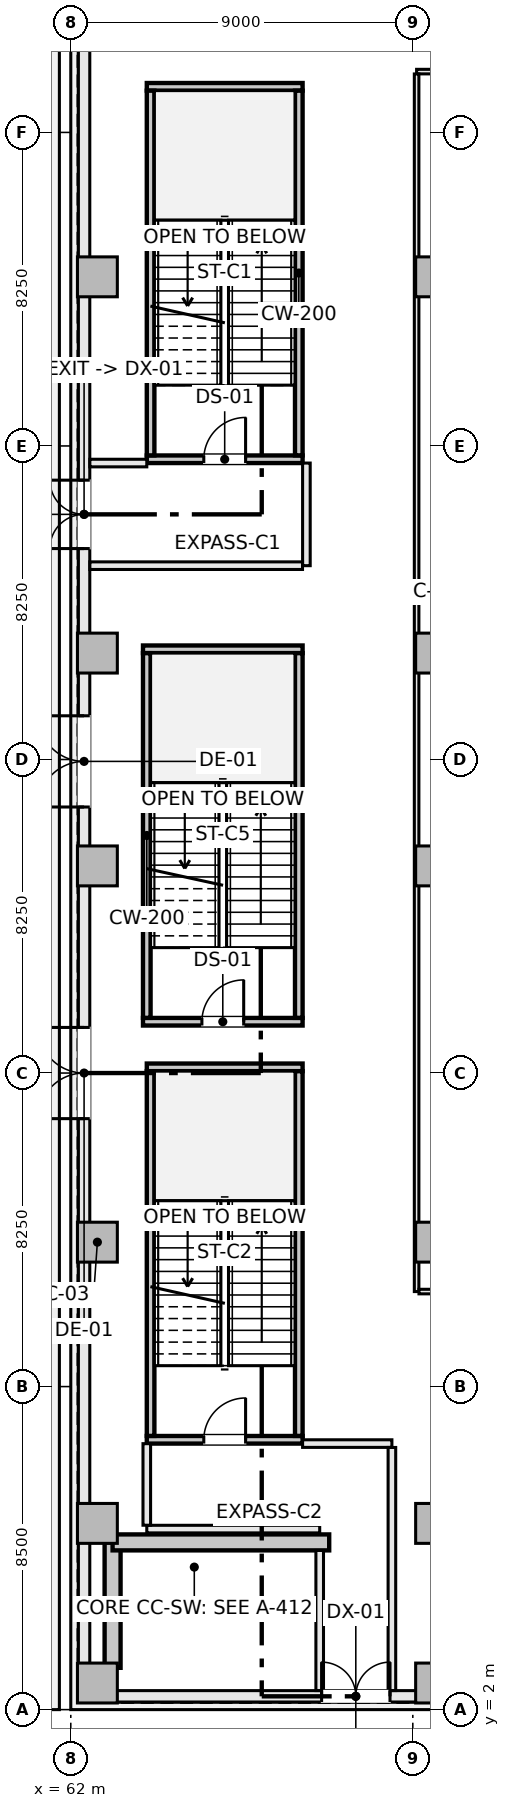
"""IFC4 building model, lengths in metres.
Left out: names, types, materials, properties, quantities, classifications, styles, units other than length and angle.
Written with IfcOpenShell. Run it as: python <this file> out.ifc"""

import sys

from ifc_helpers import new_model, si_unit, direction, frame, frame_2d, origin, origin_2d, place, context, subcontext, project, spatial, rectangle, extrude, element, fill, save


model = new_model("IFC4")
c1 = context("Model", 3, precision=1e-05, world=origin(), true_north=direction((0.0, 1.0)))
c2 = subcontext(c1, "Body", "Model", "MODEL_VIEW")
j1 = project(units=[si_unit("LENGTHUNIT", "METRE"), si_unit("PLANEANGLEUNIT", "RADIAN")], contexts=[c1])
p1 = place(None, origin())
s1 = spatial("IfcSite", under=j1, at=p1, CompositionType="ELEMENT")
p2 = place(p1, origin())
s2 = spatial("IfcBuilding", under=s1, at=p2, CompositionType="ELEMENT")
p3 = place(p2, origin())
s3 = spatial("IfcBuildingStorey", under=s2, at=p3, CompositionType="ELEMENT", Elevation=0.0)
p4 = place(p3, frame((63.1, 3.1, -0.36), z_axis=(0.0, 0.0, 1.0), x_axis=(0.0, 1.0, 0.0)))
e1 = element("IfcWall", 1, at=p4, inside=s3, PredefinedType="SHEAR", context=c2, shape_type="SweptSolid", body=[
    extrude(rectangle(XDim=3.3, YDim=0.42, at=frame_2d((1.65, 0.0))), origin(), (0.0, 0.0, 1.0), 5.1),
])
p5 = place(p3, frame((63.1, 6.4, -0.36), z_axis=(0.0, 0.0, 1.0), x_axis=(1.0, 0.0, 0.0)))
e2 = element("IfcWall", 2, at=p5, inside=s3, PredefinedType="SHEAR", context=c2, shape_type="SweptSolid", body=[
    extrude(rectangle(XDim=5.7, YDim=0.42, at=frame_2d((2.85, 0.0))), origin(), (0.0, 0.0, 1.0), 5.1),
])
for number, where, z_axis, x_axis in (
    (3, (62.7, 2.7, -0.36), (0.0, 0.0, 1.0), (1.0, 0.0, 0.0)),
    (4, (62.7, 6.9, -0.36), (0.0, 0.0, 1.0), (1.0, 0.0, 0.0)),
    (5, (62.7, 14.3, -0.36), (0.0, 0.0, 1.0), (1.0, 0.0, 0.0)),
    (6, (62.7, 24.2, -0.36), (0.0, 0.0, 1.0), (1.0, 0.0, 0.0)),
    (7, (62.7, 29.8, -0.36), (0.0, 0.0, 1.0), (1.0, 0.0, 0.0)),
    (8, (62.7, 39.7, -0.36), (0.0, 0.0, 1.0), (1.0, 0.0, 0.0)),
    (9, (71.6, 2.7, -0.36), (0.0, 0.0, 1.0), (1.0, 0.0, 0.0)),
    (10, (71.6, 6.9, -0.36), (0.0, 0.0, 1.0), (1.0, 0.0, 0.0)),
    (11, (71.6, 14.3, -0.36), (0.0, 0.0, 1.0), (1.0, 0.0, 0.0)),
    (12, (71.6, 24.2, -0.36), (0.0, 0.0, 1.0), (1.0, 0.0, 0.0)),
    (13, (71.6, 29.8, -0.36), (0.0, 0.0, 1.0), (1.0, 0.0, 0.0)),
    (14, (71.6, 39.7, -0.36), (0.0, 0.0, 1.0), (1.0, 0.0, 0.0)),
):
    element("IfcColumn", number, at=place(p3, frame(where, z_axis=z_axis, x_axis=x_axis)), inside=s3, PredefinedType="COLUMN", context=c2, shape_type="SweptSolid", body=[
        extrude(rectangle(XDim=1.05, YDim=1.05, at=origin_2d()), origin(), (0.0, 0.0, 1.0), 5.1),
    ])
p6 = place(p3, frame((62.35, 2.35, 0.0), z_axis=(0.0, 0.0, 1.0), x_axis=(1.0, 0.0, 0.0)))
e15 = element("IfcWall", 15, at=p6, inside=s3, PredefinedType="SOLIDWALL", context=c2, shape_type="SweptSolid", body=[
    extrude(rectangle(XDim=35.3, YDim=0.3, at=frame_2d((17.65, 0.0))), origin(), (0.0, 0.0, 1.0), 4.74),
])
p7 = place(p6, frame((6.25, 0.0, 0.0)))
e16 = element("IfcOpeningElement", 16, at=p7, cuts=e15, PredefinedType="OPENING", context=c2, shape_type="SweptSolid", body=[
    extrude(rectangle(XDim=1.8, YDim=2.3, at=frame_2d((0.9, 1.15))), frame((0.0, 0.16, 0.0), z_axis=(0.0, -1.0, 0.0), x_axis=(1.0, 0.0, 0.0)), (0.0, 0.0, 1.0), 0.32),
])
p8 = place(p6, frame((10.35, 0.0, 0.0)))
e17 = element("IfcOpeningElement", 17, at=p8, cuts=e15, PredefinedType="OPENING", context=c2, shape_type="SweptSolid", body=[
    extrude(rectangle(XDim=1.8, YDim=2.3, at=frame_2d((0.9, 1.15))), frame((0.0, 0.16, 0.0), z_axis=(0.0, -1.0, 0.0), x_axis=(1.0, 0.0, 0.0)), (0.0, 0.0, 1.0), 0.32),
])
p9 = place(p6, frame((27.2, 0.0, 0.0)))
e18 = element("IfcOpeningElement", 18, at=p9, cuts=e15, PredefinedType="OPENING", context=c2, shape_type="SweptSolid", body=[
    extrude(rectangle(XDim=1.8, YDim=2.3, at=frame_2d((0.9, 1.15))), frame((0.0, 0.16, 0.0), z_axis=(0.0, -1.0, 0.0), x_axis=(1.0, 0.0, 0.0)), (0.0, 0.0, 1.0), 0.32),
])
p10 = place(p3, frame((62.35, 2.35, 0.0), z_axis=(0.0, 0.0, 1.0), x_axis=(0.0, 1.0, 0.0)))
e19 = element("IfcWall", 19, at=p10, inside=s3, PredefinedType="SOLIDWALL", context=c2, shape_type="SweptSolid", body=[
    extrude(rectangle(XDim=49.3, YDim=0.3, at=frame_2d((24.65, 0.0))), origin(), (0.0, 0.0, 1.0), 4.74),
])
p11 = place(p10, frame((15.2, 0.0, 0.0)))
e20 = element("IfcOpeningElement", 20, at=p11, cuts=e19, PredefinedType="OPENING", context=c2, shape_type="SweptSolid", body=[
    extrude(rectangle(XDim=2.4, YDim=2.6, at=frame_2d((1.2, 1.3))), frame((0.0, 0.16, 0.0), z_axis=(0.0, -1.0, 0.0), x_axis=(1.0, 0.0, 0.0)), (0.0, 0.0, 1.0), 0.32),
])
p12 = place(p10, frame((23.4, 0.0, 0.0)))
e21 = element("IfcOpeningElement", 21, at=p12, cuts=e19, PredefinedType="OPENING", context=c2, shape_type="SweptSolid", body=[
    extrude(rectangle(XDim=2.4, YDim=2.6, at=frame_2d((1.2, 1.3))), frame((0.0, 0.16, 0.0), z_axis=(0.0, -1.0, 0.0), x_axis=(1.0, 0.0, 0.0)), (0.0, 0.0, 1.0), 0.32),
])
p13 = place(p10, frame((30.2, 0.0, 0.0)))
e22 = element("IfcOpeningElement", 22, at=p13, cuts=e19, PredefinedType="OPENING", context=c2, shape_type="SweptSolid", body=[
    extrude(rectangle(XDim=1.8, YDim=2.3, at=frame_2d((0.9, 1.15))), frame((0.0, 0.16, 0.0), z_axis=(0.0, -1.0, 0.0), x_axis=(1.0, 0.0, 0.0)), (0.0, 0.0, 1.0), 0.32),
])
p14 = place(p3, frame((64.0, 34.9, -0.36), z_axis=(0.0, 0.0, 1.0), x_axis=(1.0, 0.0, 0.0)))
e23 = element("IfcWall", 23, at=p14, inside=s3, PredefinedType="SHEAR", context=c2, shape_type="SweptSolid", body=[
    extrude(rectangle(XDim=4.1, YDim=0.2, at=frame_2d((2.05, 0.0))), origin(), (0.0, 0.0, 1.0), 5.1),
])
p15 = place(p14, frame((1.5, 0.0, 0.36)))
e24 = element("IfcOpeningElement", 24, at=p15, cuts=e23, PredefinedType="OPENING", context=c2, shape_type="SweptSolid", body=[
    extrude(rectangle(XDim=1.1, YDim=2.15, at=frame_2d((0.55, 1.075))), frame((0.0, 0.11, 0.0), z_axis=(0.0, -1.0, 0.0), x_axis=(1.0, 0.0, 0.0)), (0.0, 0.0, 1.0), 0.22),
])
p16 = place(p3, frame((64.0, 44.7, -0.36), z_axis=(0.0, 0.0, 1.0), x_axis=(1.0, 0.0, 0.0)))
e25 = element("IfcWall", 25, at=p16, inside=s3, PredefinedType="SHEAR", context=c2, shape_type="SweptSolid", body=[
    extrude(rectangle(XDim=4.1, YDim=0.2, at=frame_2d((2.05, 0.0))), origin(), (0.0, 0.0, 1.0), 5.1),
])
for number, where, z_axis, x_axis in (
    (26, (64.1, 35.002, -0.36), (0.0, 0.0, 1.0), (0.0, 1.0, 0.0)),
    (27, (68.0, 35.002, -0.36), (0.0, 0.0, 1.0), (0.0, 1.0, 0.0)),
):
    element("IfcWall", number, at=place(p3, frame(where, z_axis=z_axis, x_axis=x_axis)), inside=s3, PredefinedType="SHEAR", context=c2, shape_type="SweptSolid", body=[
        extrude(rectangle(XDim=9.596, YDim=0.2, at=frame_2d((4.798, 0.0))), origin(), (0.0, 0.0, 1.0), 5.1),
    ])
p17 = place(p3, frame((64.0, 9.1, -0.36), z_axis=(0.0, 0.0, 1.0), x_axis=(1.0, 0.0, 0.0)))
e28 = element("IfcWall", 28, at=p17, inside=s3, PredefinedType="SHEAR", context=c2, shape_type="SweptSolid", body=[
    extrude(rectangle(XDim=4.1, YDim=0.2, at=frame_2d((2.05, 0.0))), origin(), (0.0, 0.0, 1.0), 5.1),
])
p18 = place(p17, frame((1.5, 0.0, 0.36)))
e29 = element("IfcOpeningElement", 29, at=p18, cuts=e28, PredefinedType="OPENING", context=c2, shape_type="SweptSolid", body=[
    extrude(rectangle(XDim=1.1, YDim=2.15, at=frame_2d((0.55, 1.075))), frame((0.0, 0.11, 0.0), z_axis=(0.0, -1.0, 0.0), x_axis=(1.0, 0.0, 0.0)), (0.0, 0.0, 1.0), 0.22),
])
p19 = place(p3, frame((64.0, 18.9, -0.36), z_axis=(0.0, 0.0, 1.0), x_axis=(1.0, 0.0, 0.0)))
e30 = element("IfcWall", 30, at=p19, inside=s3, PredefinedType="SHEAR", context=c2, shape_type="SweptSolid", body=[
    extrude(rectangle(XDim=4.1, YDim=0.2, at=frame_2d((2.05, 0.0))), origin(), (0.0, 0.0, 1.0), 5.1),
])
for number, where, z_axis, x_axis in (
    (31, (64.1, 9.202, -0.36), (0.0, 0.0, 1.0), (0.0, 1.0, 0.0)),
    (32, (68.0, 9.202, -0.36), (0.0, 0.0, 1.0), (0.0, 1.0, 0.0)),
):
    element("IfcWall", number, at=place(p3, frame(where, z_axis=z_axis, x_axis=x_axis)), inside=s3, PredefinedType="SHEAR", context=c2, shape_type="SweptSolid", body=[
        extrude(rectangle(XDim=9.596, YDim=0.2, at=frame_2d((4.798, 0.0))), origin(), (0.0, 0.0, 1.0), 5.1),
    ])
p20 = place(p3, frame((63.9, 20.1, -0.36), z_axis=(0.0, 0.0, 1.0), x_axis=(1.0, 0.0, 0.0)))
e33 = element("IfcWall", 33, at=p20, inside=s3, PredefinedType="SHEAR", context=c2, shape_type="SweptSolid", body=[
    extrude(rectangle(XDim=4.2, YDim=0.2, at=frame_2d((2.1, 0.0))), origin(), (0.0, 0.0, 1.0), 5.1),
])
p21 = place(p20, frame((1.55, 0.0, 0.36)))
e34 = element("IfcOpeningElement", 34, at=p21, cuts=e33, PredefinedType="OPENING", context=c2, shape_type="SweptSolid", body=[
    extrude(rectangle(XDim=1.1, YDim=2.15, at=frame_2d((0.55, 1.075))), frame((0.0, 0.11, 0.0), z_axis=(0.0, -1.0, 0.0), x_axis=(1.0, 0.0, 0.0)), (0.0, 0.0, 1.0), 0.22),
])
p22 = place(p3, frame((63.9, 29.9, -0.36), z_axis=(0.0, 0.0, 1.0), x_axis=(1.0, 0.0, 0.0)))
e35 = element("IfcWall", 35, at=p22, inside=s3, PredefinedType="SHEAR", context=c2, shape_type="SweptSolid", body=[
    extrude(rectangle(XDim=4.2, YDim=0.2, at=frame_2d((2.1, 0.0))), origin(), (0.0, 0.0, 1.0), 5.1),
])
for number, where, z_axis, x_axis in (
    (36, (64.0, 20.202, -0.36), (0.0, 0.0, 1.0), (0.0, 1.0, 0.0)),
    (37, (68.0, 20.202, -0.36), (0.0, 0.0, 1.0), (0.0, 1.0, 0.0)),
):
    element("IfcWall", number, at=place(p3, frame(where, z_axis=z_axis, x_axis=x_axis)), inside=s3, PredefinedType="SHEAR", context=c2, shape_type="SweptSolid", body=[
        extrude(rectangle(XDim=9.596, YDim=0.2, at=frame_2d((4.798, 0.0))), origin(), (0.0, 0.0, 1.0), 5.1),
    ])
p23 = place(p3, frame((68.2, 32.1, 0.0), z_axis=(0.0, 0.0, 1.0), x_axis=(0.0, 1.0, 0.0)))
e38 = element("IfcWall", 38, at=p23, inside=s3, PredefinedType="SOLIDWALL", context=c2, shape_type="SweptSolid", body=[
    extrude(rectangle(XDim=2.7, YDim=0.2, at=frame_2d((1.35, 0.0))), origin(), (0.0, 0.0, 1.0), 4.74),
])
p24 = place(p3, frame((62.502, 32.1, 0.0), z_axis=(0.0, 0.0, 1.0), x_axis=(1.0, 0.0, 0.0)))
e39 = element("IfcWall", 39, at=p24, inside=s3, PredefinedType="SOLIDWALL", context=c2, shape_type="SweptSolid", body=[
    extrude(rectangle(XDim=5.596, YDim=0.2, at=frame_2d((2.798, 0.0))), origin(), (0.0, 0.0, 1.0), 4.74),
])
p25 = place(p3, frame((62.502, 34.8, 0.0), z_axis=(0.0, 0.0, 1.0), x_axis=(1.0, 0.0, 0.0)))
e40 = element("IfcWall", 40, at=p25, inside=s3, PredefinedType="SOLIDWALL", context=c2, shape_type="SweptSolid", body=[
    extrude(rectangle(XDim=1.498, YDim=0.2, at=frame_2d((0.749, 0.0))), origin(), (0.0, 0.0, 1.0), 4.375),
])
p26 = place(p3, frame((68.55, 2.502, 0.0), z_axis=(0.0, 0.0, 1.0), x_axis=(0.0, 1.0, 0.0)))
e41 = element("IfcWall", 41, at=p26, inside=s3, PredefinedType="SOLIDWALL", context=c2, shape_type="SweptSolid", body=[
    extrude(rectangle(XDim=3.686, YDim=0.2, at=frame_2d((1.843, 0.0))), origin(), (0.0, 0.0, 1.0), 4.74),
])
p27 = place(p3, frame((64.0, 6.75, 0.0), z_axis=(0.0, 0.0, 1.0), x_axis=(1.0, 0.0, 0.0)))
e42 = element("IfcWall", 42, at=p27, inside=s3, PredefinedType="SOLIDWALL", context=c2, shape_type="SweptSolid", body=[
    extrude(rectangle(XDim=4.55, YDim=0.2, at=frame_2d((2.275, 0.0))), origin(), (0.0, 0.0, 1.0), 4.188),
])
p28 = place(p3, frame((64.0, 6.852, 0.0), z_axis=(0.0, 0.0, 1.0), x_axis=(0.0, 1.0, 0.0)))
e43 = element("IfcWall", 43, at=p28, inside=s3, PredefinedType="SOLIDWALL", context=c2, shape_type="SweptSolid", body=[
    extrude(rectangle(XDim=2.146, YDim=0.2, at=frame_2d((1.073, 0.0))), origin(), (0.0, 0.0, 1.0), 4.74),
])
p29 = place(p3, frame((68.1, 9.0, 0.0), z_axis=(0.0, 0.0, 1.0), x_axis=(1.0, 0.0, 0.0)))
e44 = element("IfcWall", 44, at=p29, inside=s3, PredefinedType="SOLIDWALL", context=c2, shape_type="SweptSolid", body=[
    extrude(rectangle(XDim=2.35, YDim=0.2, at=frame_2d((1.175, 0.0))), origin(), (0.0, 0.0, 1.0), 4.74),
])
p30 = place(p3, frame((70.45, 2.502, 0.0), z_axis=(0.0, 0.0, 1.0), x_axis=(0.0, 1.0, 0.0)))
e45 = element("IfcWall", 45, at=p30, inside=s3, PredefinedType="SOLIDWALL", context=c2, shape_type="SweptSolid", body=[
    extrude(rectangle(XDim=6.396, YDim=0.2, at=frame_2d((3.198, 0.0))), origin(), (0.0, 0.0, 1.0), 4.74),
])
p31 = place(p3, frame((62.502, 6.6, 0.0), z_axis=(0.0, 0.0, 1.0), x_axis=(1.0, 0.0, 0.0)))
e46 = element("IfcWall", 46, at=p31, inside=s3, PredefinedType="PARTITIONING", context=c2, shape_type="SweptSolid", body=[
    extrude(rectangle(XDim=0.598, YDim=0.12, at=frame_2d((0.299, 0.0))), origin(), (0.0, 0.0, 1.0), 4.74),
])
p32 = place(p3, frame((71.1, 45.1, 0.0), z_axis=(0.0, 0.0, 1.0), x_axis=(1.0, 0.0, 0.0)))
e47 = element("IfcWall", 47, at=p32, inside=s3, PredefinedType="PARTITIONING", context=c2, shape_type="SweptSolid", body=[
    extrude(rectangle(XDim=1.388, YDim=0.12, at=frame_2d((0.694, 0.0))), origin(), (0.0, 0.0, 1.0), 4.74),
])
p33 = place(p3, frame((71.1, 13.0, 0.0), z_axis=(0.0, 0.0, 1.0), x_axis=(0.0, 1.0, 0.0)))
e48 = element("IfcWall", 48, at=p33, inside=s3, PredefinedType="PARTITIONING", context=c2, shape_type="SweptSolid", body=[
    extrude(rectangle(XDim=32.038, YDim=0.12, at=frame_2d((16.019, 0.0))), origin(), (0.0, 0.0, 1.0), 4.74),
])
p34 = place(p3, frame((71.162, 13.0, 0.0), z_axis=(0.0, 0.0, 1.0), x_axis=(1.0, 0.0, 0.0)))
e49 = element("IfcWall", 49, at=p34, inside=s3, PredefinedType="PARTITIONING", context=c2, shape_type="SweptSolid", body=[
    extrude(rectangle(XDim=17.738, YDim=0.12, at=frame_2d((8.869, 0.0))), origin(), (0.0, 0.0, 1.0), 4.74),
])
p35 = place(p7, frame((1.8, 0.0, 0.0), z_axis=(0.0, 0.0, 1.0), x_axis=(-1.0, 0.0, 0.0)))
e50 = element("IfcDoor", 50, at=p35, inside=s3, OperationType="DOUBLE_DOOR_SINGLE_SWING", PredefinedType="DOOR", context=c2, shape_type="SweptSolid", body=[
    extrude(rectangle(XDim=1.8, YDim=2.3, at=frame_2d((0.9, 1.15))), frame((0.0, 0.025, 0.0), z_axis=(0.0, -1.0, 0.0), x_axis=(1.0, 0.0, 0.0)), (0.0, 0.0, 1.0), 0.05),
])
fill(e16, e50)
p36 = place(p11, origin())
e51 = element("IfcDoor", 51, at=p36, inside=s3, OperationType="DOUBLE_DOOR_SINGLE_SWING", PredefinedType="DOOR", context=c2, shape_type="SweptSolid", body=[
    extrude(rectangle(XDim=2.4, YDim=2.6, at=frame_2d((1.2, 1.3))), frame((0.0, 0.025, 0.0), z_axis=(0.0, -1.0, 0.0), x_axis=(1.0, 0.0, 0.0)), (0.0, 0.0, 1.0), 0.05),
])
fill(e20, e51)
p37 = place(p12, origin())
e52 = element("IfcDoor", 52, at=p37, inside=s3, OperationType="DOUBLE_DOOR_SINGLE_SWING", PredefinedType="DOOR", context=c2, shape_type="SweptSolid", body=[
    extrude(rectangle(XDim=2.4, YDim=2.6, at=frame_2d((1.2, 1.3))), frame((0.0, 0.025, 0.0), z_axis=(0.0, -1.0, 0.0), x_axis=(1.0, 0.0, 0.0)), (0.0, 0.0, 1.0), 0.05),
])
fill(e21, e52)
p38 = place(p13, origin())
e53 = element("IfcDoor", 53, at=p38, inside=s3, OperationType="DOUBLE_DOOR_SINGLE_SWING", PredefinedType="DOOR", context=c2, shape_type="SweptSolid", body=[
    extrude(rectangle(XDim=1.8, YDim=2.3, at=frame_2d((0.9, 1.15))), frame((0.0, 0.025, 0.0), z_axis=(0.0, -1.0, 0.0), x_axis=(1.0, 0.0, 0.0)), (0.0, 0.0, 1.0), 0.05),
])
fill(e22, e53)
p39 = place(p15, origin())
e54 = element("IfcDoor", 54, at=p39, inside=s3, OperationType="SINGLE_SWING_RIGHT", PredefinedType="DOOR", context=c2, shape_type="SweptSolid", body=[
    extrude(rectangle(XDim=1.1, YDim=2.15, at=frame_2d((0.55, 1.075))), frame((0.0, 0.025, 0.0), z_axis=(0.0, -1.0, 0.0), x_axis=(1.0, 0.0, 0.0)), (0.0, 0.0, 1.0), 0.05),
])
fill(e24, e54)
p40 = place(p18, origin())
e55 = element("IfcDoor", 55, at=p40, inside=s3, OperationType="SINGLE_SWING_RIGHT", PredefinedType="DOOR", context=c2, shape_type="SweptSolid", body=[
    extrude(rectangle(XDim=1.1, YDim=2.15, at=frame_2d((0.55, 1.075))), frame((0.0, 0.025, 0.0), z_axis=(0.0, -1.0, 0.0), x_axis=(1.0, 0.0, 0.0)), (0.0, 0.0, 1.0), 0.05),
])
fill(e29, e55)
p41 = place(p21, origin())
e56 = element("IfcDoor", 56, at=p41, inside=s3, OperationType="SINGLE_SWING_RIGHT", PredefinedType="DOOR", context=c2, shape_type="SweptSolid", body=[
    extrude(rectangle(XDim=1.1, YDim=2.15, at=frame_2d((0.55, 1.075))), frame((0.0, 0.025, 0.0), z_axis=(0.0, -1.0, 0.0), x_axis=(1.0, 0.0, 0.0)), (0.0, 0.0, 1.0), 0.05),
])
fill(e34, e56)
save(model, sys.argv[1])
